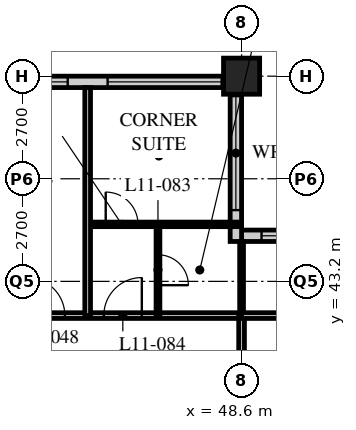
"""IFC4 building model, lengths in metres.
Left out: names, types, materials, properties, quantities, classifications, styles, units other than length and angle.
Written with IfcOpenShell. Run it as: python <this file> out.ifc"""

import sys

from ifc_helpers import new_model, si_unit, direction, frame, frame_2d, origin, origin_2d, place, context, subcontext, project, spatial, rectangle, hollow_rectangle, extrude, element, fill, save


model = new_model("IFC4")
c1 = context("Model", 3, precision=1e-05, world=origin(), true_north=direction((0.0, 1.0)))
c2 = subcontext(c1, "Body", "Model", "MODEL_VIEW")
j1 = project(units=[si_unit("LENGTHUNIT", "METRE"), si_unit("PLANEANGLEUNIT", "RADIAN")], contexts=[c1])
p1 = place(None, origin())
s1 = spatial("IfcSite", under=j1, at=p1, CompositionType="ELEMENT")
p2 = place(p1, origin())
s2 = spatial("IfcBuilding", under=s1, at=p2, CompositionType="ELEMENT")
p3 = place(p2, frame((0.0, 0.0, 50.0)))
s3 = spatial("IfcBuildingStorey", under=s2, at=p3, CompositionType="ELEMENT", Elevation=50.0)
p4 = place(p3, frame((48.6, 48.6, 0.0), z_axis=(0.0, 0.0, 1.0), x_axis=(1.0, 0.0, 0.0)))
e1 = element("IfcColumn", 1, at=p4, inside=s3, PredefinedType="COLUMN", context=c2, shape_type="SweptSolid", body=[
    extrude(hollow_rectangle(XDim=0.95, YDim=0.95, WallThickness=0.095, at=origin_2d()), origin(), (0.0, 0.0, 1.0), 3.4),
])
p5 = place(p3, frame((52.35, 44.4, 0.0), z_axis=(0.0, 0.0, 1.0), x_axis=(-1.0, 0.0, 0.0)))
e2 = element("IfcWall", 2, at=p5, inside=s3, PredefinedType="SOLIDWALL", context=c2, shape_type="SweptSolid", body=[
    extrude(rectangle(XDim=3.75, YDim=0.3, at=frame_2d((1.875, 0.0))), origin(), (0.0, 0.0, 1.0), 3.19),
])
p6 = place(p5, frame((0.225, 0.0, 0.9)))
e3 = element("IfcOpeningElement", 3, at=p6, cuts=e2, PredefinedType="OPENING", context=c2, shape_type="SweptSolid", body=[
    extrude(rectangle(XDim=3.0, YDim=1.5, at=frame_2d((1.5, 0.75))), frame((0.0, 0.16, 0.0), z_axis=(0.0, -1.0, 0.0), x_axis=(1.0, 0.0, 0.0)), (0.0, 0.0, 1.0), 0.32),
])
p7 = place(p3, frame((48.45, 44.25, 0.0), z_axis=(0.0, 0.0, 1.0), x_axis=(0.0, 1.0, 0.0)))
e4 = element("IfcWall", 4, at=p7, inside=s3, PredefinedType="SOLIDWALL", context=c2, shape_type="SweptSolid", body=[
    extrude(rectangle(XDim=4.35, YDim=0.3, at=frame_2d((2.175, 0.0))), origin(), (0.0, 0.0, 1.0), 3.19),
])
p8 = place(p7, frame((0.825, 0.0, 0.9)))
e5 = element("IfcOpeningElement", 5, at=p8, cuts=e4, PredefinedType="OPENING", context=c2, shape_type="SweptSolid", body=[
    extrude(rectangle(XDim=3.0, YDim=1.5, at=frame_2d((1.5, 0.75))), frame((0.0, 0.16, 0.0), z_axis=(0.0, -1.0, 0.0), x_axis=(1.0, 0.0, 0.0)), (0.0, 0.0, 1.0), 0.32),
])
p9 = place(p3, frame((48.3, 48.45, 0.0), z_axis=(0.0, 0.0, 1.0), x_axis=(-1.0, 0.0, 0.0)))
e6 = element("IfcWall", 6, at=p9, inside=s3, PredefinedType="SOLIDWALL", context=c2, shape_type="SweptSolid", body=[
    extrude(rectangle(XDim=40.2, YDim=0.3, at=frame_2d((20.1, 0.0))), origin(), (0.0, 0.0, 1.0), 3.19),
])
p10 = place(p9, frame((0.225, 0.0, 0.9)))
e7 = element("IfcOpeningElement", 7, at=p10, cuts=e6, PredefinedType="OPENING", context=c2, shape_type="SweptSolid", body=[
    extrude(rectangle(XDim=3.0, YDim=2.0, at=frame_2d((1.5, 1.0))), frame((0.0, 0.16, 0.0), z_axis=(0.0, -1.0, 0.0), x_axis=(1.0, 0.0, 0.0)), (0.0, 0.0, 1.0), 0.32),
])
p11 = place(p9, frame((4.275, 0.0, 0.9)))
e8 = element("IfcOpeningElement", 8, at=p11, cuts=e6, PredefinedType="OPENING", context=c2, shape_type="SweptSolid", body=[
    extrude(rectangle(XDim=3.0, YDim=2.0, at=frame_2d((1.5, 1.0))), frame((0.0, 0.16, 0.0), z_axis=(0.0, -1.0, 0.0), x_axis=(1.0, 0.0, 0.0)), (0.0, 0.0, 1.0), 0.32),
])
p12 = place(p9, frame((8.325, 0.0, 0.9)))
e9 = element("IfcOpeningElement", 9, at=p12, cuts=e6, PredefinedType="OPENING", context=c2, shape_type="SweptSolid", body=[
    extrude(rectangle(XDim=3.0, YDim=2.0, at=frame_2d((1.5, 1.0))), frame((0.0, 0.16, 0.0), z_axis=(0.0, -1.0, 0.0), x_axis=(1.0, 0.0, 0.0)), (0.0, 0.0, 1.0), 0.32),
])
p13 = place(p9, frame((12.375, 0.0, 0.9)))
e10 = element("IfcOpeningElement", 10, at=p13, cuts=e6, PredefinedType="OPENING", context=c2, shape_type="SweptSolid", body=[
    extrude(rectangle(XDim=3.0, YDim=2.0, at=frame_2d((1.5, 1.0))), frame((0.0, 0.16, 0.0), z_axis=(0.0, -1.0, 0.0), x_axis=(1.0, 0.0, 0.0)), (0.0, 0.0, 1.0), 0.32),
])
p14 = place(p9, frame((16.425, 0.0, 0.9)))
e11 = element("IfcOpeningElement", 11, at=p14, cuts=e6, PredefinedType="OPENING", context=c2, shape_type="SweptSolid", body=[
    extrude(rectangle(XDim=3.0, YDim=2.0, at=frame_2d((1.5, 1.0))), frame((0.0, 0.16, 0.0), z_axis=(0.0, -1.0, 0.0), x_axis=(1.0, 0.0, 0.0)), (0.0, 0.0, 1.0), 0.32),
])
p15 = place(p9, frame((20.475, 0.0, 0.9)))
e12 = element("IfcOpeningElement", 12, at=p15, cuts=e6, PredefinedType="OPENING", context=c2, shape_type="SweptSolid", body=[
    extrude(rectangle(XDim=3.0, YDim=2.0, at=frame_2d((1.5, 1.0))), frame((0.0, 0.16, 0.0), z_axis=(0.0, -1.0, 0.0), x_axis=(1.0, 0.0, 0.0)), (0.0, 0.0, 1.0), 0.32),
])
p16 = place(p9, frame((24.525, 0.0, 0.9)))
e13 = element("IfcOpeningElement", 13, at=p16, cuts=e6, PredefinedType="OPENING", context=c2, shape_type="SweptSolid", body=[
    extrude(rectangle(XDim=3.0, YDim=2.0, at=frame_2d((1.5, 1.0))), frame((0.0, 0.16, 0.0), z_axis=(0.0, -1.0, 0.0), x_axis=(1.0, 0.0, 0.0)), (0.0, 0.0, 1.0), 0.32),
])
p17 = place(p9, frame((28.575, 0.0, 0.9)))
e14 = element("IfcOpeningElement", 14, at=p17, cuts=e6, PredefinedType="OPENING", context=c2, shape_type="SweptSolid", body=[
    extrude(rectangle(XDim=3.0, YDim=2.0, at=frame_2d((1.5, 1.0))), frame((0.0, 0.16, 0.0), z_axis=(0.0, -1.0, 0.0), x_axis=(1.0, 0.0, 0.0)), (0.0, 0.0, 1.0), 0.32),
])
p18 = place(p9, frame((32.625, 0.0, 0.9)))
e15 = element("IfcOpeningElement", 15, at=p18, cuts=e6, PredefinedType="OPENING", context=c2, shape_type="SweptSolid", body=[
    extrude(rectangle(XDim=3.0, YDim=2.0, at=frame_2d((1.5, 1.0))), frame((0.0, 0.16, 0.0), z_axis=(0.0, -1.0, 0.0), x_axis=(1.0, 0.0, 0.0)), (0.0, 0.0, 1.0), 0.32),
])
p19 = place(p9, frame((36.675, 0.0, 0.9)))
e16 = element("IfcOpeningElement", 16, at=p19, cuts=e6, PredefinedType="OPENING", context=c2, shape_type="SweptSolid", body=[
    extrude(rectangle(XDim=3.0, YDim=2.0, at=frame_2d((1.5, 1.0))), frame((0.0, 0.16, 0.0), z_axis=(0.0, -1.0, 0.0), x_axis=(1.0, 0.0, 0.0)), (0.0, 0.0, 1.0), 0.32),
])
p20 = place(p3, frame((8.1, 42.3, 0.0), z_axis=(0.0, 0.0, 1.0), x_axis=(1.0, 0.0, 0.0)))
e17 = element("IfcWall", 17, at=p20, inside=s3, PredefinedType="PARTITIONING", context=c2, shape_type="SweptSolid", body=[
    extrude(rectangle(XDim=40.5, YDim=0.15, at=frame_2d((20.25, 0.0))), origin(), (0.0, 0.0, 1.0), 3.19),
])
p21 = place(p20, frame((6.5, 0.0, 0.0)))
e18 = element("IfcOpeningElement", 18, at=p21, cuts=e17, PredefinedType="OPENING", context=c2, shape_type="SweptSolid", body=[
    extrude(rectangle(XDim=1.0, YDim=2.1, at=frame_2d((0.5, 1.05))), frame((0.0, 0.085, 0.0), z_axis=(0.0, -1.0, 0.0), x_axis=(1.0, 0.0, 0.0)), (0.0, 0.0, 1.0), 0.17),
])
p22 = place(p20, frame((10.55, 0.0, 0.0)))
e19 = element("IfcOpeningElement", 19, at=p22, cuts=e17, PredefinedType="OPENING", context=c2, shape_type="SweptSolid", body=[
    extrude(rectangle(XDim=1.0, YDim=2.1, at=frame_2d((0.5, 1.05))), frame((0.0, 0.085, 0.0), z_axis=(0.0, -1.0, 0.0), x_axis=(1.0, 0.0, 0.0)), (0.0, 0.0, 1.0), 0.17),
])
p23 = place(p20, frame((14.6, 0.0, 0.0)))
e20 = element("IfcOpeningElement", 20, at=p23, cuts=e17, PredefinedType="OPENING", context=c2, shape_type="SweptSolid", body=[
    extrude(rectangle(XDim=1.0, YDim=2.1, at=frame_2d((0.5, 1.05))), frame((0.0, 0.085, 0.0), z_axis=(0.0, -1.0, 0.0), x_axis=(1.0, 0.0, 0.0)), (0.0, 0.0, 1.0), 0.17),
])
p24 = place(p20, frame((18.65, 0.0, 0.0)))
e21 = element("IfcOpeningElement", 21, at=p24, cuts=e17, PredefinedType="OPENING", context=c2, shape_type="SweptSolid", body=[
    extrude(rectangle(XDim=1.0, YDim=2.1, at=frame_2d((0.5, 1.05))), frame((0.0, 0.085, 0.0), z_axis=(0.0, -1.0, 0.0), x_axis=(1.0, 0.0, 0.0)), (0.0, 0.0, 1.0), 0.17),
])
p25 = place(p20, frame((22.7, 0.0, 0.0)))
e22 = element("IfcOpeningElement", 22, at=p25, cuts=e17, PredefinedType="OPENING", context=c2, shape_type="SweptSolid", body=[
    extrude(rectangle(XDim=1.0, YDim=2.1, at=frame_2d((0.5, 1.05))), frame((0.0, 0.085, 0.0), z_axis=(0.0, -1.0, 0.0), x_axis=(1.0, 0.0, 0.0)), (0.0, 0.0, 1.0), 0.17),
])
p26 = place(p20, frame((26.75, 0.0, 0.0)))
e23 = element("IfcOpeningElement", 23, at=p26, cuts=e17, PredefinedType="OPENING", context=c2, shape_type="SweptSolid", body=[
    extrude(rectangle(XDim=1.0, YDim=2.1, at=frame_2d((0.5, 1.05))), frame((0.0, 0.085, 0.0), z_axis=(0.0, -1.0, 0.0), x_axis=(1.0, 0.0, 0.0)), (0.0, 0.0, 1.0), 0.17),
])
p27 = place(p20, frame((30.8, 0.0, 0.0)))
e24 = element("IfcOpeningElement", 24, at=p27, cuts=e17, PredefinedType="OPENING", context=c2, shape_type="SweptSolid", body=[
    extrude(rectangle(XDim=1.0, YDim=2.1, at=frame_2d((0.5, 1.05))), frame((0.0, 0.085, 0.0), z_axis=(0.0, -1.0, 0.0), x_axis=(1.0, 0.0, 0.0)), (0.0, 0.0, 1.0), 0.17),
])
p28 = place(p20, frame((34.85, 0.0, 0.0)))
e25 = element("IfcOpeningElement", 25, at=p28, cuts=e17, PredefinedType="OPENING", context=c2, shape_type="SweptSolid", body=[
    extrude(rectangle(XDim=1.0, YDim=2.1, at=frame_2d((0.5, 1.05))), frame((0.0, 0.085, 0.0), z_axis=(0.0, -1.0, 0.0), x_axis=(1.0, 0.0, 0.0)), (0.0, 0.0, 1.0), 0.17),
])
p29 = place(p20, frame((36.875, 0.0, 0.0)))
e26 = element("IfcOpeningElement", 26, at=p29, cuts=e17, PredefinedType="OPENING", context=c2, shape_type="SweptSolid", body=[
    extrude(rectangle(XDim=1.0, YDim=2.1, at=frame_2d((0.5, 1.05))), frame((0.0, 0.085, 0.0), z_axis=(0.0, -1.0, 0.0), x_axis=(1.0, 0.0, 0.0)), (0.0, 0.0, 1.0), 0.17),
])
p30 = place(p20, frame((2.625, 0.0, 0.0)))
e27 = element("IfcOpeningElement", 27, at=p30, cuts=e17, PredefinedType="OPENING", context=c2, shape_type="SweptSolid", body=[
    extrude(rectangle(XDim=1.0, YDim=2.1, at=frame_2d((0.5, 1.05))), frame((0.0, 0.085, 0.0), z_axis=(0.0, -1.0, 0.0), x_axis=(1.0, 0.0, 0.0)), (0.0, 0.0, 1.0), 0.17),
])
p31 = place(p3, frame((48.6, 16.2, 0.0), z_axis=(0.0, 0.0, 1.0), x_axis=(0.0, 1.0, 0.0)))
e28 = element("IfcWall", 28, at=p31, inside=s3, PredefinedType="PARTITIONING", context=c2, shape_type="SweptSolid", body=[
    extrude(rectangle(XDim=26.1, YDim=0.15, at=frame_2d((13.05, 0.0))), origin(), (0.0, 0.0, 1.0), 2.578),
])
p32 = place(p31, frame((2.75, 0.0, 0.0)))
e29 = element("IfcOpeningElement", 29, at=p32, cuts=e28, PredefinedType="OPENING", context=c2, shape_type="SweptSolid", body=[
    extrude(rectangle(XDim=1.0, YDim=2.1, at=frame_2d((0.5, 1.05))), frame((0.0, 0.085, 0.0), z_axis=(0.0, -1.0, 0.0), x_axis=(1.0, 0.0, 0.0)), (0.0, 0.0, 1.0), 0.17),
])
p33 = place(p31, frame((4.35, 0.0, 0.0)))
e30 = element("IfcOpeningElement", 30, at=p33, cuts=e28, PredefinedType="OPENING", context=c2, shape_type="SweptSolid", body=[
    extrude(rectangle(XDim=1.0, YDim=2.1, at=frame_2d((0.5, 1.05))), frame((0.0, 0.085, 0.0), z_axis=(0.0, -1.0, 0.0), x_axis=(1.0, 0.0, 0.0)), (0.0, 0.0, 1.0), 0.17),
])
p34 = place(p31, frame((10.85, 0.0, 0.0)))
e31 = element("IfcOpeningElement", 31, at=p34, cuts=e28, PredefinedType="OPENING", context=c2, shape_type="SweptSolid", body=[
    extrude(rectangle(XDim=1.0, YDim=2.1, at=frame_2d((0.5, 1.05))), frame((0.0, 0.085, 0.0), z_axis=(0.0, -1.0, 0.0), x_axis=(1.0, 0.0, 0.0)), (0.0, 0.0, 1.0), 0.17),
])
p35 = place(p31, frame((12.45, 0.0, 0.0)))
e32 = element("IfcOpeningElement", 32, at=p35, cuts=e28, PredefinedType="OPENING", context=c2, shape_type="SweptSolid", body=[
    extrude(rectangle(XDim=1.0, YDim=2.1, at=frame_2d((0.5, 1.05))), frame((0.0, 0.085, 0.0), z_axis=(0.0, -1.0, 0.0), x_axis=(1.0, 0.0, 0.0)), (0.0, 0.0, 1.0), 0.17),
])
p36 = place(p31, frame((18.65, 0.0, 0.0)))
e33 = element("IfcOpeningElement", 33, at=p36, cuts=e28, PredefinedType="OPENING", context=c2, shape_type="SweptSolid", body=[
    extrude(rectangle(XDim=1.0, YDim=2.1, at=frame_2d((0.5, 1.05))), frame((0.0, 0.085, 0.0), z_axis=(0.0, -1.0, 0.0), x_axis=(1.0, 0.0, 0.0)), (0.0, 0.0, 1.0), 0.17),
])
p37 = place(p31, frame((22.7, 0.0, 0.0)))
e34 = element("IfcOpeningElement", 34, at=p37, cuts=e28, PredefinedType="OPENING", context=c2, shape_type="SweptSolid", body=[
    extrude(rectangle(XDim=1.0, YDim=2.1, at=frame_2d((0.5, 1.05))), frame((0.0, 0.085, 0.0), z_axis=(0.0, -1.0, 0.0), x_axis=(1.0, 0.0, 0.0)), (0.0, 0.0, 1.0), 0.17),
])
p38 = place(p3, frame((44.55, 44.7, 0.0), z_axis=(0.0, 0.0, 1.0), x_axis=(1.0, 0.0, 0.0)))
e35 = element("IfcWall", 35, at=p38, inside=s3, PredefinedType="PARTITIONING", context=c2, shape_type="SweptSolid", body=[
    extrude(rectangle(XDim=4.05, YDim=0.12, at=frame_2d((2.025, 0.0))), origin(), (0.0, 0.0, 1.0), 3.19),
])
p39 = place(p38, frame((0.475, 0.0, 0.0)))
e36 = element("IfcOpeningElement", 36, at=p39, cuts=e35, PredefinedType="OPENING", context=c2, shape_type="SweptSolid", body=[
    extrude(rectangle(XDim=0.85, YDim=2.1, at=frame_2d((0.425, 1.05))), frame((0.0, 0.07, 0.0), z_axis=(0.0, -1.0, 0.0), x_axis=(1.0, 0.0, 0.0)), (0.0, 0.0, 1.0), 0.14),
])
p40 = place(p3, frame((46.4, 42.3, 0.0), z_axis=(0.0, 0.0, 1.0), x_axis=(0.0, 1.0, 0.0)))
e37 = element("IfcWall", 37, at=p40, inside=s3, PredefinedType="PARTITIONING", context=c2, shape_type="SweptSolid", body=[
    extrude(rectangle(XDim=2.4, YDim=0.1, at=frame_2d((1.2, 0.0))), origin(), (0.0, 0.0, 1.0), 3.19),
])
p41 = place(p40, frame((0.8, 0.0, 0.0)))
e38 = element("IfcOpeningElement", 38, at=p41, cuts=e37, PredefinedType="OPENING", context=c2, shape_type="SweptSolid", body=[
    extrude(rectangle(XDim=0.8, YDim=2.1, at=frame_2d((0.4, 1.05))), frame((0.0, 0.06, 0.0), z_axis=(0.0, -1.0, 0.0), x_axis=(1.0, 0.0, 0.0)), (0.0, 0.0, 1.0), 0.12),
])
p42 = place(p3, frame((48.6, 42.3, 0.0), z_axis=(0.0, 0.0, 1.0), x_axis=(0.0, 1.0, 0.0)))
e39 = element("IfcWall", 39, at=p42, inside=s3, PredefinedType="PARTITIONING", context=c2, shape_type="SweptSolid", body=[
    extrude(rectangle(XDim=1.95, YDim=0.1, at=frame_2d((0.975, 0.0))), origin(), (0.0, 0.0, 1.0), 2.578),
])
p43 = place(p3, frame((48.6, 42.3, 0.0), z_axis=(0.0, 0.0, 1.0), x_axis=(1.0, 0.0, 0.0)))
e40 = element("IfcWall", 40, at=p43, inside=s3, PredefinedType="PARTITIONING", context=c2, shape_type="SweptSolid", body=[
    extrude(rectangle(XDim=3.75, YDim=0.15, at=frame_2d((1.875, 0.0))), origin(), (0.0, 0.0, 1.0), 3.19),
])
p44 = place(p3, frame((44.55, 42.3, 0.0), z_axis=(0.0, 0.0, 1.0), x_axis=(0.0, 1.0, 0.0)))
e41 = element("IfcWall", 41, at=p44, inside=s3, PredefinedType="PARTITIONING", context=c2, shape_type="SweptSolid", body=[
    extrude(rectangle(XDim=6.0, YDim=0.15, at=frame_2d((3.0, 0.0))), origin(), (0.0, 0.0, 1.0), 3.19),
])
p45 = place(p6, origin())
e42 = element("IfcWindow", 42, at=p45, inside=s3, PartitioningType="SINGLE_PANEL", PredefinedType="WINDOW", context=c2, shape_type="SweptSolid", body=[
    extrude(rectangle(XDim=3.0, YDim=1.5, at=frame_2d((1.5, 0.75))), frame((0.0, 0.03, 0.0), z_axis=(0.0, -1.0, 0.0), x_axis=(1.0, 0.0, 0.0)), (0.0, 0.0, 1.0), 0.06),
])
fill(e3, e42)
p46 = place(p8, origin())
e43 = element("IfcWindow", 43, at=p46, inside=s3, PartitioningType="SINGLE_PANEL", PredefinedType="WINDOW", context=c2, shape_type="SweptSolid", body=[
    extrude(rectangle(XDim=3.0, YDim=1.5, at=frame_2d((1.5, 0.75))), frame((0.0, 0.03, 0.0), z_axis=(0.0, -1.0, 0.0), x_axis=(1.0, 0.0, 0.0)), (0.0, 0.0, 1.0), 0.06),
])
fill(e5, e43)
p47 = place(p10, origin())
e44 = element("IfcWindow", 44, at=p47, inside=s3, PartitioningType="SINGLE_PANEL", PredefinedType="WINDOW", context=c2, shape_type="SweptSolid", body=[
    extrude(rectangle(XDim=3.0, YDim=2.0, at=frame_2d((1.5, 1.0))), frame((0.0, 0.03, 0.0), z_axis=(0.0, -1.0, 0.0), x_axis=(1.0, 0.0, 0.0)), (0.0, 0.0, 1.0), 0.06),
])
fill(e7, e44)
p48 = place(p11, origin())
e45 = element("IfcWindow", 45, at=p48, inside=s3, PartitioningType="SINGLE_PANEL", PredefinedType="WINDOW", context=c2, shape_type="SweptSolid", body=[
    extrude(rectangle(XDim=3.0, YDim=2.0, at=frame_2d((1.5, 1.0))), frame((0.0, 0.03, 0.0), z_axis=(0.0, -1.0, 0.0), x_axis=(1.0, 0.0, 0.0)), (0.0, 0.0, 1.0), 0.06),
])
fill(e8, e45)
p49 = place(p28, origin())
e46 = element("IfcDoor", 46, at=p49, inside=s3, OperationType="SINGLE_SWING_LEFT", PredefinedType="DOOR", context=c2, shape_type="SweptSolid", body=[
    extrude(rectangle(XDim=1.0, YDim=2.1, at=frame_2d((0.5, 1.05))), frame((0.0, 0.025, 0.0), z_axis=(0.0, -1.0, 0.0), x_axis=(1.0, 0.0, 0.0)), (0.0, 0.0, 1.0), 0.05),
])
fill(e25, e46)
p50 = place(p41, origin())
e47 = element("IfcDoor", 47, at=p50, inside=s3, OperationType="SINGLE_SWING_RIGHT", PredefinedType="DOOR", context=c2, shape_type="SweptSolid", body=[
    extrude(rectangle(XDim=0.8, YDim=2.1, at=frame_2d((0.4, 1.05))), frame((0.0, 0.025, 0.0), z_axis=(0.0, -1.0, 0.0), x_axis=(1.0, 0.0, 0.0)), (0.0, 0.0, 1.0), 0.05),
])
fill(e38, e47)
p51 = place(p29, origin())
e48 = element("IfcDoor", 48, at=p51, inside=s3, OperationType="SINGLE_SWING_RIGHT", PredefinedType="DOOR", context=c2, shape_type="SweptSolid", body=[
    extrude(rectangle(XDim=1.0, YDim=2.1, at=frame_2d((0.5, 1.05))), frame((0.0, 0.025, 0.0), z_axis=(0.0, -1.0, 0.0), x_axis=(1.0, 0.0, 0.0)), (0.0, 0.0, 1.0), 0.05),
])
fill(e26, e48)
p52 = place(p39, origin())
e49 = element("IfcDoor", 49, at=p52, inside=s3, OperationType="SINGLE_SWING_LEFT", PredefinedType="DOOR", context=c2, shape_type="SweptSolid", body=[
    extrude(rectangle(XDim=0.85, YDim=2.1, at=frame_2d((0.425, 1.05))), frame((0.0, 0.025, 0.0), z_axis=(0.0, -1.0, 0.0), x_axis=(1.0, 0.0, 0.0)), (0.0, 0.0, 1.0), 0.05),
])
fill(e36, e49)
save(model, sys.argv[1])
